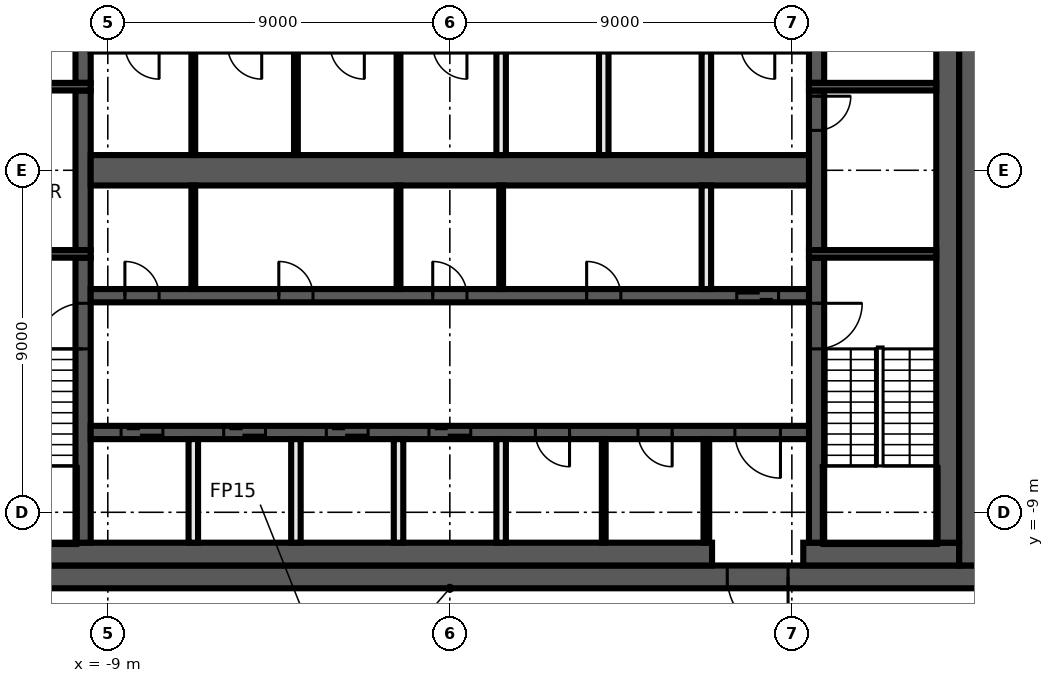
"""IFC4 building model, lengths in metres.
Left out: names, types, materials, properties, quantities, classifications, styles, units other than length and angle.
Written with IfcOpenShell. Run it as: python <this file> out.ifc"""

import sys

from ifc_helpers import new_model, si_unit, direction, frame, frame_2d, origin, place, context, subcontext, project, spatial, rectangle, extrude, element, fill, save


model = new_model("IFC4")
c1 = context("Model", 3, precision=1e-05, world=origin(), true_north=direction((0.0, 1.0)))
c2 = subcontext(c1, "Body", "Model", "MODEL_VIEW")
j1 = project(units=[si_unit("LENGTHUNIT", "METRE"), si_unit("PLANEANGLEUNIT", "RADIAN")], contexts=[c1])
p1 = place(None, origin())
s1 = spatial("IfcSite", under=j1, at=p1, CompositionType="ELEMENT")
p2 = place(p1, origin())
s2 = spatial("IfcBuilding", under=s1, at=p2, CompositionType="ELEMENT")
p3 = place(p2, frame((0.0, 0.0, 332.0)))
s3 = spatial("IfcBuildingStorey", under=s2, at=p3, CompositionType="ELEMENT", Elevation=332.0)
p4 = place(p3, frame((14.0, -10.7, 0.0), z_axis=(0.0, 0.0, 1.0), x_axis=(-1.0, 0.0, 0.0)))
e1 = element("IfcWall", 1, at=p4, inside=s3, PredefinedType="SHEAR", context=c2, shape_type="SweptSolid", body=[
    extrude(rectangle(XDim=28.0, YDim=0.6, at=frame_2d((14.0, 0.0))), origin(), (0.0, 0.0, 1.0), 3.82),
])
p5 = place(p4, frame((5.1, 0.0, 0.0)))
e2 = element("IfcOpeningElement", 2, at=p5, cuts=e1, PredefinedType="OPENING", context=c2, shape_type="SweptSolid", body=[
    extrude(rectangle(XDim=1.6, YDim=2.1, at=frame_2d((0.8, 1.05))), frame((0.0, 0.31, 0.0), z_axis=(0.0, -1.0, 0.0), x_axis=(1.0, 0.0, 0.0)), (0.0, 0.0, 1.0), 0.62),
])
p6 = place(p3, frame((13.7, 10.4, 0.0), z_axis=(0.0, 0.0, 1.0), x_axis=(0.0, -1.0, 0.0)))
e3 = element("IfcWall", 3, at=p6, inside=s3, PredefinedType="SHEAR", context=c2, shape_type="SweptSolid", body=[
    extrude(rectangle(XDim=20.8, YDim=0.6, at=frame_2d((10.4, 0.0))), origin(), (0.0, 0.0, 1.0), 3.82),
])
p7 = place(p3, frame((13.4, -10.1, 0.0), z_axis=(0.0, 0.0, 1.0), x_axis=(-1.0, 0.0, 0.0)))
e4 = element("IfcWall", 4, at=p7, inside=s3, PredefinedType="SHEAR", context=c2, shape_type="SweptSolid", body=[
    extrude(rectangle(XDim=4.1, YDim=0.6, at=frame_2d((2.05, 0.0))), origin(), (0.0, 0.0, 1.0), 3.82),
])
p8 = place(p3, frame((6.9, -10.1, 0.0), z_axis=(0.0, 0.0, 1.0), x_axis=(-1.0, 0.0, 0.0)))
e5 = element("IfcWall", 5, at=p8, inside=s3, PredefinedType="SHEAR", context=c2, shape_type="SweptSolid", body=[
    extrude(rectangle(XDim=20.3, YDim=0.6, at=frame_2d((10.15, 0.0))), origin(), (0.0, 0.0, 1.0), 3.82),
])
p9 = place(p3, frame((13.1, 9.8, 0.0), z_axis=(0.0, 0.0, 1.0), x_axis=(0.0, -1.0, 0.0)))
e6 = element("IfcWall", 6, at=p9, inside=s3, PredefinedType="SHEAR", context=c2, shape_type="SweptSolid", body=[
    extrude(rectangle(XDim=19.6, YDim=0.6, at=frame_2d((9.8, 0.0))), origin(), (0.0, 0.0, 1.0), 3.82),
])
p10 = place(p3, frame((9.65, -2.3, 0.0), z_axis=(0.0, 0.0, 1.0), x_axis=(0.0, -1.0, 0.0)))
e7 = element("IfcWall", 7, at=p10, inside=s3, PredefinedType="SHEAR", context=c2, shape_type="SweptSolid", body=[
    extrude(rectangle(XDim=7.5, YDim=0.4, at=frame_2d((3.75, 0.0))), origin(), (0.0, 0.0, 1.0), 3.82),
])
p11 = place(p10, frame((1.2, 0.0, 0.0)))
e8 = element("IfcOpeningElement", 8, at=p11, cuts=e7, PredefinedType="OPENING", context=c2, shape_type="SweptSolid", body=[
    extrude(rectangle(XDim=1.2, YDim=2.1, at=frame_2d((0.6, 1.05))), frame((0.0, 0.21, 0.0), z_axis=(0.0, -1.0, 0.0), x_axis=(1.0, 0.0, 0.0)), (0.0, 0.0, 1.0), 0.42),
])
p12 = place(p3, frame((9.65, 2.1, 0.0), z_axis=(0.0, 0.0, 1.0), x_axis=(0.0, -1.0, 0.0)))
e9 = element("IfcWall", 9, at=p12, inside=s3, PredefinedType="SHEAR", context=c2, shape_type="SweptSolid", body=[
    extrude(rectangle(XDim=4.2, YDim=0.4, at=frame_2d((2.1, 0.0))), origin(), (0.0, 0.0, 1.0), 3.82),
])
p13 = place(p12, frame((0.15, 0.0, 0.0)))
e10 = element("IfcOpeningElement", 10, at=p13, cuts=e9, PredefinedType="OPENING", context=c2, shape_type="SweptSolid", body=[
    extrude(rectangle(XDim=0.9, YDim=2.1, at=frame_2d((0.45, 1.05))), frame((0.0, 0.21, 0.0), z_axis=(0.0, -1.0, 0.0), x_axis=(1.0, 0.0, 0.0)), (0.0, 0.0, 1.0), 0.42),
])
p14 = place(p3, frame((9.65, 9.8, 0.0), z_axis=(0.0, 0.0, 1.0), x_axis=(0.0, -1.0, 0.0)))
e11 = element("IfcWall", 11, at=p14, inside=s3, PredefinedType="SHEAR", context=c2, shape_type="SweptSolid", body=[
    extrude(rectangle(XDim=7.5, YDim=0.4, at=frame_2d((3.75, 0.0))), origin(), (0.0, 0.0, 1.0), 3.82),
])
p15 = place(p14, frame((5.1, 0.0, 0.0)))
e12 = element("IfcOpeningElement", 12, at=p15, cuts=e11, PredefinedType="OPENING", context=c2, shape_type="SweptSolid", body=[
    extrude(rectangle(XDim=1.2, YDim=2.1, at=frame_2d((0.6, 1.05))), frame((0.0, 0.21, 0.0), z_axis=(0.0, -1.0, 0.0), x_axis=(1.0, 0.0, 0.0)), (0.0, 0.0, 1.0), 0.42),
])
p16 = place(p3, frame((-9.65, -9.8, 0.0), z_axis=(0.0, 0.0, 1.0), x_axis=(0.0, 1.0, 0.0)))
e13 = element("IfcWall", 13, at=p16, inside=s3, PredefinedType="SHEAR", context=c2, shape_type="SweptSolid", body=[
    extrude(rectangle(XDim=7.5, YDim=0.4, at=frame_2d((3.75, 0.0))), origin(), (0.0, 0.0, 1.0), 3.82),
])
p17 = place(p16, frame((5.1, 0.0, 0.0)))
e14 = element("IfcOpeningElement", 14, at=p17, cuts=e13, PredefinedType="OPENING", context=c2, shape_type="SweptSolid", body=[
    extrude(rectangle(XDim=1.2, YDim=2.1, at=frame_2d((0.6, 1.05))), frame((0.0, 0.21, 0.0), z_axis=(0.0, -1.0, 0.0), x_axis=(1.0, 0.0, 0.0)), (0.0, 0.0, 1.0), 0.42),
])
p18 = place(p3, frame((-9.65, -2.1, 0.0), z_axis=(0.0, 0.0, 1.0), x_axis=(0.0, 1.0, 0.0)))
e15 = element("IfcWall", 15, at=p18, inside=s3, PredefinedType="SHEAR", context=c2, shape_type="SweptSolid", body=[
    extrude(rectangle(XDim=4.2, YDim=0.4, at=frame_2d((2.1, 0.0))), origin(), (0.0, 0.0, 1.0), 3.82),
])
p19 = place(p3, frame((-9.65, 2.3, 0.0), z_axis=(0.0, 0.0, 1.0), x_axis=(0.0, 1.0, 0.0)))
e16 = element("IfcWall", 16, at=p19, inside=s3, PredefinedType="SHEAR", context=c2, shape_type="SweptSolid", body=[
    extrude(rectangle(XDim=7.5, YDim=0.4, at=frame_2d((3.75, 0.0))), origin(), (0.0, 0.0, 1.0), 3.82),
])
p20 = place(p19, frame((1.2, 0.0, 0.0)))
e17 = element("IfcOpeningElement", 17, at=p20, cuts=e16, PredefinedType="OPENING", context=c2, shape_type="SweptSolid", body=[
    extrude(rectangle(XDim=1.2, YDim=2.1, at=frame_2d((0.6, 1.05))), frame((0.0, 0.21, 0.0), z_axis=(0.0, -1.0, 0.0), x_axis=(1.0, 0.0, 0.0)), (0.0, 0.0, 1.0), 0.42),
])
for number, where, z_axis, x_axis in (
    (18, (9.45, 2.2, 0.0), (0.0, 0.0, 1.0), (1.0, 0.0, 0.0)),
    (19, (-9.45, 2.2, 0.0), (0.0, 0.0, 1.0), (-1.0, 0.0, 0.0)),
    (20, (9.45, -2.2, 0.0), (0.0, 0.0, 1.0), (1.0, 0.0, 0.0)),
    (21, (-9.45, -2.2, 0.0), (0.0, 0.0, 1.0), (-1.0, 0.0, 0.0)),
):
    element("IfcWall", number, at=place(p3, frame(where, z_axis=z_axis, x_axis=x_axis)), inside=s3, PredefinedType="SHEAR", context=c2, shape_type="SweptSolid", body=[
        extrude(rectangle(XDim=3.35, YDim=0.2, at=frame_2d((1.675, 0.0))), origin(), (0.0, 0.0, 1.0), 3.82),
    ])
p21 = place(p3, frame((-9.45, -3.3, 0.0), z_axis=(0.0, 0.0, 1.0), x_axis=(1.0, 0.0, 0.0)))
e22 = element("IfcWall", 22, at=p21, inside=s3, PredefinedType="SHEAR", context=c2, shape_type="SweptSolid", body=[
    extrude(rectangle(XDim=18.9, YDim=0.35, at=frame_2d((9.45, 0.0))), origin(), (0.0, 0.0, 1.0), 3.82),
])
p22 = place(p21, frame((17.0, 0.0, 0.0)))
e23 = element("IfcOpeningElement", 23, at=p22, cuts=e22, PredefinedType="OPENING", context=c2, shape_type="SweptSolid", body=[
    extrude(rectangle(XDim=1.1, YDim=2.1, at=frame_2d((0.55, 1.05))), frame((0.0, 0.185, 0.0), z_axis=(0.0, -1.0, 0.0), x_axis=(1.0, 0.0, 0.0)), (0.0, 0.0, 1.0), 0.37),
])
p23 = place(p21, frame((0.9, 0.0, 0.0)))
e24 = element("IfcOpeningElement", 24, at=p23, cuts=e22, PredefinedType="OPENING", context=c2, shape_type="SweptSolid", body=[
    extrude(rectangle(XDim=0.9, YDim=2.1, at=frame_2d((0.45, 1.05))), frame((0.0, 0.185, 0.0), z_axis=(0.0, -1.0, 0.0), x_axis=(1.0, 0.0, 0.0)), (0.0, 0.0, 1.0), 0.37),
])
p24 = place(p21, frame((4.95, 0.0, 0.0)))
e25 = element("IfcOpeningElement", 25, at=p24, cuts=e22, PredefinedType="OPENING", context=c2, shape_type="SweptSolid", body=[
    extrude(rectangle(XDim=0.9, YDim=2.1, at=frame_2d((0.45, 1.05))), frame((0.0, 0.185, 0.0), z_axis=(0.0, -1.0, 0.0), x_axis=(1.0, 0.0, 0.0)), (0.0, 0.0, 1.0), 0.37),
])
p25 = place(p21, frame((9.0, 0.0, 0.0)))
e26 = element("IfcOpeningElement", 26, at=p25, cuts=e22, PredefinedType="OPENING", context=c2, shape_type="SweptSolid", body=[
    extrude(rectangle(XDim=0.9, YDim=2.1, at=frame_2d((0.45, 1.05))), frame((0.0, 0.185, 0.0), z_axis=(0.0, -1.0, 0.0), x_axis=(1.0, 0.0, 0.0)), (0.0, 0.0, 1.0), 0.37),
])
p26 = place(p21, frame((13.05, 0.0, 0.0)))
e27 = element("IfcOpeningElement", 27, at=p26, cuts=e22, PredefinedType="OPENING", context=c2, shape_type="SweptSolid", body=[
    extrude(rectangle(XDim=0.9, YDim=2.1, at=frame_2d((0.45, 1.05))), frame((0.0, 0.185, 0.0), z_axis=(0.0, -1.0, 0.0), x_axis=(1.0, 0.0, 0.0)), (0.0, 0.0, 1.0), 0.37),
])
p27 = place(p3, frame((9.45, -6.9, 0.0), z_axis=(0.0, 0.0, 1.0), x_axis=(-1.0, 0.0, 0.0)))
e28 = element("IfcWall", 28, at=p27, inside=s3, PredefinedType="SHEAR", context=c2, shape_type="SweptSolid", body=[
    extrude(rectangle(XDim=18.9, YDim=0.35, at=frame_2d((9.45, 0.0))), origin(), (0.0, 0.0, 1.0), 3.82),
])
p28 = place(p27, frame((17.0, 0.0, 0.0)))
e29 = element("IfcOpeningElement", 29, at=p28, cuts=e28, PredefinedType="OPENING", context=c2, shape_type="SweptSolid", body=[
    extrude(rectangle(XDim=1.1, YDim=2.1, at=frame_2d((0.55, 1.05))), frame((0.0, 0.185, 0.0), z_axis=(0.0, -1.0, 0.0), x_axis=(1.0, 0.0, 0.0)), (0.0, 0.0, 1.0), 0.37),
])
p29 = place(p27, frame((14.3, 0.0, 0.0)))
e30 = element("IfcOpeningElement", 30, at=p29, cuts=e28, PredefinedType="OPENING", context=c2, shape_type="SweptSolid", body=[
    extrude(rectangle(XDim=1.1, YDim=2.1, at=frame_2d((0.55, 1.05))), frame((0.0, 0.185, 0.0), z_axis=(0.0, -1.0, 0.0), x_axis=(1.0, 0.0, 0.0)), (0.0, 0.0, 1.0), 0.37),
])
p30 = place(p27, frame((11.6, 0.0, 0.0)))
e31 = element("IfcOpeningElement", 31, at=p30, cuts=e28, PredefinedType="OPENING", context=c2, shape_type="SweptSolid", body=[
    extrude(rectangle(XDim=1.1, YDim=2.1, at=frame_2d((0.55, 1.05))), frame((0.0, 0.185, 0.0), z_axis=(0.0, -1.0, 0.0), x_axis=(1.0, 0.0, 0.0)), (0.0, 0.0, 1.0), 0.37),
])
p31 = place(p27, frame((8.9, 0.0, 0.0)))
e32 = element("IfcOpeningElement", 32, at=p31, cuts=e28, PredefinedType="OPENING", context=c2, shape_type="SweptSolid", body=[
    extrude(rectangle(XDim=1.1, YDim=2.1, at=frame_2d((0.55, 1.05))), frame((0.0, 0.185, 0.0), z_axis=(0.0, -1.0, 0.0), x_axis=(1.0, 0.0, 0.0)), (0.0, 0.0, 1.0), 0.37),
])
p32 = place(p27, frame((0.75, 0.0, 0.0)))
e33 = element("IfcOpeningElement", 33, at=p32, cuts=e28, PredefinedType="OPENING", context=c2, shape_type="SweptSolid", body=[
    extrude(rectangle(XDim=1.2, YDim=2.1, at=frame_2d((0.6, 1.05))), frame((0.0, 0.185, 0.0), z_axis=(0.0, -1.0, 0.0), x_axis=(1.0, 0.0, 0.0)), (0.0, 0.0, 1.0), 0.37),
])
p33 = place(p27, frame((6.3, 0.0, 0.0)))
e34 = element("IfcOpeningElement", 34, at=p33, cuts=e28, PredefinedType="OPENING", context=c2, shape_type="SweptSolid", body=[
    extrude(rectangle(XDim=0.9, YDim=2.1, at=frame_2d((0.45, 1.05))), frame((0.0, 0.185, 0.0), z_axis=(0.0, -1.0, 0.0), x_axis=(1.0, 0.0, 0.0)), (0.0, 0.0, 1.0), 0.37),
])
p34 = place(p27, frame((3.6, 0.0, 0.0)))
e35 = element("IfcOpeningElement", 35, at=p34, cuts=e28, PredefinedType="OPENING", context=c2, shape_type="SweptSolid", body=[
    extrude(rectangle(XDim=0.9, YDim=2.1, at=frame_2d((0.45, 1.05))), frame((0.0, 0.185, 0.0), z_axis=(0.0, -1.0, 0.0), x_axis=(1.0, 0.0, 0.0)), (0.0, 0.0, 1.0), 0.37),
])
p35 = place(p3, frame((-9.45, 0.0, 0.0), z_axis=(0.0, 0.0, 1.0), x_axis=(1.0, 0.0, 0.0)))
e36 = element("IfcWall", 36, at=p35, inside=s3, PredefinedType="SHEAR", context=c2, shape_type="SweptSolid", body=[
    extrude(rectangle(XDim=18.9, YDim=0.8, at=frame_2d((9.45, 0.0))), origin(), (0.0, 0.0, 1.0), 3.82),
])
p36 = place(p3, frame((6.75, -9.8, 0.0), z_axis=(0.0, 0.0, 1.0), x_axis=(0.0, 1.0, 0.0)))
e37 = element("IfcWall", 37, at=p36, inside=s3, PredefinedType="PARTITIONING", context=c2, shape_type="SweptSolid", body=[
    extrude(rectangle(XDim=2.725, YDim=0.15, at=frame_2d((1.363, 0.0))), origin(), (0.0, 0.0, 1.0), 3.82),
])
for number, where, z_axis, x_axis in (
    (38, (6.75, -3.125, 0.0), (0.0, 0.0, 1.0), (0.0, 1.0, 0.0)),
    (39, (6.75, 0.4, 0.0), (0.0, 0.0, 1.0), (0.0, 1.0, 0.0)),
):
    element("IfcWall", number, at=place(p3, frame(where, z_axis=z_axis, x_axis=x_axis)), inside=s3, PredefinedType="SOLIDWALL", context=c2, shape_type="SweptSolid", body=[
        extrude(rectangle(XDim=2.725, YDim=0.25, at=frame_2d((1.363, 0.0))), origin(), (0.0, 0.0, 1.0), 3.82),
    ])
p37 = place(p3, frame((4.05, -9.8, 0.0), z_axis=(0.0, 0.0, 1.0), x_axis=(0.0, 1.0, 0.0)))
e40 = element("IfcWall", 40, at=p37, inside=s3, PredefinedType="PARTITIONING", context=c2, shape_type="SweptSolid", body=[
    extrude(rectangle(XDim=2.725, YDim=0.1, at=frame_2d((1.363, 0.0))), origin(), (0.0, 0.0, 1.0), 3.82),
])
p38 = place(p3, frame((4.05, 0.4, 0.0), z_axis=(0.0, 0.0, 1.0), x_axis=(0.0, 1.0, 0.0)))
e41 = element("IfcWall", 41, at=p38, inside=s3, PredefinedType="SOLIDWALL", context=c2, shape_type="SweptSolid", body=[
    extrude(rectangle(XDim=2.725, YDim=0.25, at=frame_2d((1.363, 0.0))), origin(), (0.0, 0.0, 1.0), 3.82),
])
p39 = place(p3, frame((1.35, -3.125, 0.0), z_axis=(0.0, 0.0, 1.0), x_axis=(0.0, 1.0, 0.0)))
e42 = element("IfcWall", 42, at=p39, inside=s3, PredefinedType="PARTITIONING", context=c2, shape_type="SweptSolid", body=[
    extrude(rectangle(XDim=2.725, YDim=0.1, at=frame_2d((1.363, 0.0))), origin(), (0.0, 0.0, 1.0), 3.82),
])
for number, where, z_axis, x_axis in (
    (43, (1.35, -9.8, 0.0), (0.0, 0.0, 1.0), (0.0, 1.0, 0.0)),
    (44, (1.35, 0.4, 0.0), (0.0, 0.0, 1.0), (0.0, 1.0, 0.0)),
):
    element("IfcWall", number, at=place(p3, frame(where, z_axis=z_axis, x_axis=x_axis)), inside=s3, PredefinedType="SOLIDWALL", context=c2, shape_type="SweptSolid", body=[
        extrude(rectangle(XDim=2.725, YDim=0.25, at=frame_2d((1.363, 0.0))), origin(), (0.0, 0.0, 1.0), 3.82),
    ])
for number, where, z_axis, x_axis in (
    (45, (-1.35, -3.125, 0.0), (0.0, 0.0, 1.0), (0.0, 1.0, 0.0)),
    (46, (-1.35, 0.4, 0.0), (0.0, 0.0, 1.0), (0.0, 1.0, 0.0)),
):
    element("IfcWall", number, at=place(p3, frame(where, z_axis=z_axis, x_axis=x_axis)), inside=s3, PredefinedType="PARTITIONING", context=c2, shape_type="SweptSolid", body=[
        extrude(rectangle(XDim=2.725, YDim=0.1, at=frame_2d((1.363, 0.0))), origin(), (0.0, 0.0, 1.0), 3.82),
    ])
p40 = place(p3, frame((-1.35, -9.8, 0.0), z_axis=(0.0, 0.0, 1.0), x_axis=(0.0, 1.0, 0.0)))
e47 = element("IfcWall", 47, at=p40, inside=s3, PredefinedType="SOLIDWALL", context=c2, shape_type="SweptSolid", body=[
    extrude(rectangle(XDim=2.725, YDim=0.25, at=frame_2d((1.363, 0.0))), origin(), (0.0, 0.0, 1.0), 3.82),
])
p41 = place(p3, frame((-4.05, 0.4, 0.0), z_axis=(0.0, 0.0, 1.0), x_axis=(0.0, 1.0, 0.0)))
e48 = element("IfcWall", 48, at=p41, inside=s3, PredefinedType="PARTITIONING", context=c2, shape_type="SweptSolid", body=[
    extrude(rectangle(XDim=2.725, YDim=0.1, at=frame_2d((1.363, 0.0))), origin(), (0.0, 0.0, 1.0), 3.82),
])
p42 = place(p3, frame((-4.05, -9.8, 0.0), z_axis=(0.0, 0.0, 1.0), x_axis=(0.0, 1.0, 0.0)))
e49 = element("IfcWall", 49, at=p42, inside=s3, PredefinedType="SOLIDWALL", context=c2, shape_type="SweptSolid", body=[
    extrude(rectangle(XDim=2.725, YDim=0.25, at=frame_2d((1.363, 0.0))), origin(), (0.0, 0.0, 1.0), 3.82),
])
for number, where, z_axis, x_axis in (
    (50, (-6.75, -3.125, 0.0), (0.0, 0.0, 1.0), (0.0, 1.0, 0.0)),
    (51, (-6.75, 0.4, 0.0), (0.0, 0.0, 1.0), (0.0, 1.0, 0.0)),
):
    element("IfcWall", number, at=place(p3, frame(where, z_axis=z_axis, x_axis=x_axis)), inside=s3, PredefinedType="PARTITIONING", context=c2, shape_type="SweptSolid", body=[
        extrude(rectangle(XDim=2.725, YDim=0.1, at=frame_2d((1.363, 0.0))), origin(), (0.0, 0.0, 1.0), 3.82),
    ])
p43 = place(p3, frame((-6.75, -9.8, 0.0), z_axis=(0.0, 0.0, 1.0), x_axis=(0.0, 1.0, 0.0)))
e52 = element("IfcWall", 52, at=p43, inside=s3, PredefinedType="SOLIDWALL", context=c2, shape_type="SweptSolid", body=[
    extrude(rectangle(XDim=2.725, YDim=0.25, at=frame_2d((1.363, 0.0))), origin(), (0.0, 0.0, 1.0), 3.82),
])
p44 = place(p13, origin())
e53 = element("IfcDoor", 53, at=p44, inside=s3, OperationType="SINGLE_SWING_RIGHT", PredefinedType="DOOR", context=c2, shape_type="SweptSolid", body=[
    extrude(rectangle(XDim=0.9, YDim=2.1, at=frame_2d((0.45, 1.05))), frame((0.0, 0.025, 0.0), z_axis=(0.0, -1.0, 0.0), x_axis=(1.0, 0.0, 0.0)), (0.0, 0.0, 1.0), 0.05),
])
fill(e10, e53)
p45 = place(p22, origin())
e54 = element("IfcDoor", 54, at=p45, inside=s3, OperationType="DOUBLE_DOOR_SLIDING", PredefinedType="DOOR", context=c2, shape_type="SweptSolid", body=[
    extrude(rectangle(XDim=1.1, YDim=2.1, at=frame_2d((0.55, 1.05))), frame((0.0, 0.025, 0.0), z_axis=(0.0, -1.0, 0.0), x_axis=(1.0, 0.0, 0.0)), (0.0, 0.0, 1.0), 0.05),
])
fill(e23, e54)
p46 = place(p28, origin())
e55 = element("IfcDoor", 55, at=p46, inside=s3, OperationType="DOUBLE_DOOR_SLIDING", PredefinedType="DOOR", context=c2, shape_type="SweptSolid", body=[
    extrude(rectangle(XDim=1.1, YDim=2.1, at=frame_2d((0.55, 1.05))), frame((0.0, 0.025, 0.0), z_axis=(0.0, -1.0, 0.0), x_axis=(1.0, 0.0, 0.0)), (0.0, 0.0, 1.0), 0.05),
])
fill(e29, e55)
p47 = place(p29, origin())
e56 = element("IfcDoor", 56, at=p47, inside=s3, OperationType="DOUBLE_DOOR_SLIDING", PredefinedType="DOOR", context=c2, shape_type="SweptSolid", body=[
    extrude(rectangle(XDim=1.1, YDim=2.1, at=frame_2d((0.55, 1.05))), frame((0.0, 0.025, 0.0), z_axis=(0.0, -1.0, 0.0), x_axis=(1.0, 0.0, 0.0)), (0.0, 0.0, 1.0), 0.05),
])
fill(e30, e56)
p48 = place(p30, origin())
e57 = element("IfcDoor", 57, at=p48, inside=s3, OperationType="DOUBLE_DOOR_SLIDING", PredefinedType="DOOR", context=c2, shape_type="SweptSolid", body=[
    extrude(rectangle(XDim=1.1, YDim=2.1, at=frame_2d((0.55, 1.05))), frame((0.0, 0.025, 0.0), z_axis=(0.0, -1.0, 0.0), x_axis=(1.0, 0.0, 0.0)), (0.0, 0.0, 1.0), 0.05),
])
fill(e31, e57)
p49 = place(p31, origin())
e58 = element("IfcDoor", 58, at=p49, inside=s3, OperationType="DOUBLE_DOOR_SLIDING", PredefinedType="DOOR", context=c2, shape_type="SweptSolid", body=[
    extrude(rectangle(XDim=1.1, YDim=2.1, at=frame_2d((0.55, 1.05))), frame((0.0, 0.025, 0.0), z_axis=(0.0, -1.0, 0.0), x_axis=(1.0, 0.0, 0.0)), (0.0, 0.0, 1.0), 0.05),
])
fill(e32, e58)
p50 = place(p5, origin())
e59 = element("IfcDoor", 59, at=p50, inside=s3, OperationType="DOUBLE_DOOR_SINGLE_SWING", PredefinedType="DOOR", context=c2, shape_type="SweptSolid", body=[
    extrude(rectangle(XDim=1.6, YDim=2.1, at=frame_2d((0.8, 1.05))), frame((0.0, 0.025, 0.0), z_axis=(0.0, -1.0, 0.0), x_axis=(1.0, 0.0, 0.0)), (0.0, 0.0, 1.0), 0.05),
])
fill(e2, e59)
p51 = place(p32, origin())
e60 = element("IfcDoor", 60, at=p51, inside=s3, OperationType="SINGLE_SWING_LEFT", PredefinedType="DOOR", context=c2, shape_type="SweptSolid", body=[
    extrude(rectangle(XDim=1.2, YDim=2.1, at=frame_2d((0.6, 1.05))), frame((0.0, 0.025, 0.0), z_axis=(0.0, -1.0, 0.0), x_axis=(1.0, 0.0, 0.0)), (0.0, 0.0, 1.0), 0.05),
])
fill(e33, e60)
p52 = place(p23, origin())
e61 = element("IfcDoor", 61, at=p52, inside=s3, OperationType="SINGLE_SWING_RIGHT", PredefinedType="DOOR", context=c2, shape_type="SweptSolid", body=[
    extrude(rectangle(XDim=0.9, YDim=2.1, at=frame_2d((0.45, 1.05))), frame((0.0, 0.025, 0.0), z_axis=(0.0, -1.0, 0.0), x_axis=(1.0, 0.0, 0.0)), (0.0, 0.0, 1.0), 0.05),
])
fill(e24, e61)
p53 = place(p24, origin())
e62 = element("IfcDoor", 62, at=p53, inside=s3, OperationType="SINGLE_SWING_LEFT", PredefinedType="DOOR", context=c2, shape_type="SweptSolid", body=[
    extrude(rectangle(XDim=0.9, YDim=2.1, at=frame_2d((0.45, 1.05))), frame((0.0, 0.025, 0.0), z_axis=(0.0, -1.0, 0.0), x_axis=(1.0, 0.0, 0.0)), (0.0, 0.0, 1.0), 0.05),
])
fill(e25, e62)
p54 = place(p25, origin())
e63 = element("IfcDoor", 63, at=p54, inside=s3, OperationType="SINGLE_SWING_RIGHT", PredefinedType="DOOR", context=c2, shape_type="SweptSolid", body=[
    extrude(rectangle(XDim=0.9, YDim=2.1, at=frame_2d((0.45, 1.05))), frame((0.0, 0.025, 0.0), z_axis=(0.0, -1.0, 0.0), x_axis=(1.0, 0.0, 0.0)), (0.0, 0.0, 1.0), 0.05),
])
fill(e26, e63)
p55 = place(p26, origin())
e64 = element("IfcDoor", 64, at=p55, inside=s3, OperationType="SINGLE_SWING_LEFT", PredefinedType="DOOR", context=c2, shape_type="SweptSolid", body=[
    extrude(rectangle(XDim=0.9, YDim=2.1, at=frame_2d((0.45, 1.05))), frame((0.0, 0.025, 0.0), z_axis=(0.0, -1.0, 0.0), x_axis=(1.0, 0.0, 0.0)), (0.0, 0.0, 1.0), 0.05),
])
fill(e27, e64)
p56 = place(p33, origin())
e65 = element("IfcDoor", 65, at=p56, inside=s3, OperationType="SINGLE_SWING_RIGHT", PredefinedType="DOOR", context=c2, shape_type="SweptSolid", body=[
    extrude(rectangle(XDim=0.9, YDim=2.1, at=frame_2d((0.45, 1.05))), frame((0.0, 0.025, 0.0), z_axis=(0.0, -1.0, 0.0), x_axis=(1.0, 0.0, 0.0)), (0.0, 0.0, 1.0), 0.05),
])
fill(e34, e65)
p57 = place(p34, origin())
e66 = element("IfcDoor", 66, at=p57, inside=s3, OperationType="SINGLE_SWING_LEFT", PredefinedType="DOOR", context=c2, shape_type="SweptSolid", body=[
    extrude(rectangle(XDim=0.9, YDim=2.1, at=frame_2d((0.45, 1.05))), frame((0.0, 0.025, 0.0), z_axis=(0.0, -1.0, 0.0), x_axis=(1.0, 0.0, 0.0)), (0.0, 0.0, 1.0), 0.05),
])
fill(e35, e66)
p58 = place(p11, origin())
e67 = element("IfcDoor", 67, at=p58, inside=s3, OperationType="SINGLE_SWING_RIGHT", PredefinedType="DOOR", context=c2, shape_type="SweptSolid", body=[
    extrude(rectangle(XDim=1.2, YDim=2.1, at=frame_2d((0.6, 1.05))), frame((0.0, 0.025, 0.0), z_axis=(0.0, -1.0, 0.0), x_axis=(1.0, 0.0, 0.0)), (0.0, 0.0, 1.0), 0.05),
])
fill(e8, e67)
p59 = place(p17, origin())
e68 = element("IfcDoor", 68, at=p59, inside=s3, OperationType="SINGLE_SWING_LEFT", PredefinedType="DOOR", context=c2, shape_type="SweptSolid", body=[
    extrude(rectangle(XDim=1.2, YDim=2.1, at=frame_2d((0.6, 1.05))), frame((0.0, 0.025, 0.0), z_axis=(0.0, -1.0, 0.0), x_axis=(1.0, 0.0, 0.0)), (0.0, 0.0, 1.0), 0.05),
])
fill(e14, e68)
save(model, sys.argv[1])
